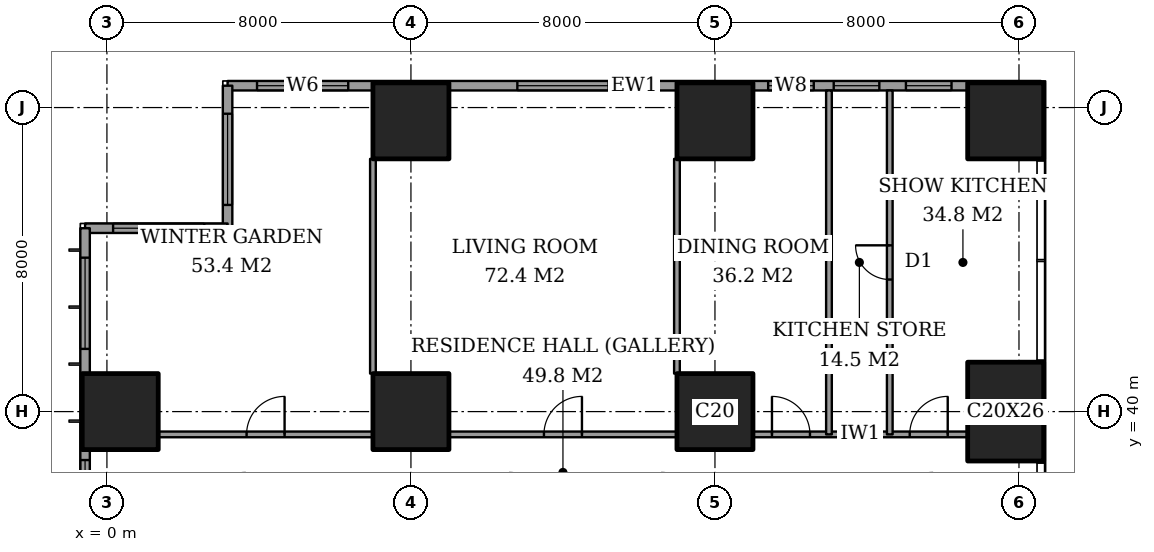
"""IFC4 building model, lengths in metres.
Left out: names, types, materials, properties, quantities, classifications, styles, units other than length and angle.
Written with IfcOpenShell. Run it as: python <this file> out.ifc"""

import sys

from ifc_helpers import new_model, si_unit, direction, frame, frame_2d, origin, origin_2d, place, context, subcontext, project, spatial, rectangle, extrude, element, fill, save


model = new_model("IFC4")
c1 = context("Model", 3, precision=1e-05, world=origin(), true_north=direction((0.0, 1.0)))
c2 = subcontext(c1, "Body", "Model", "MODEL_VIEW")
j1 = project(units=[si_unit("LENGTHUNIT", "METRE"), si_unit("PLANEANGLEUNIT", "RADIAN")], contexts=[c1])
p1 = place(None, origin())
s1 = spatial("IfcSite", under=j1, at=p1, CompositionType="ELEMENT")
p2 = place(p1, origin())
s2 = spatial("IfcBuilding", under=s1, at=p2, CompositionType="ELEMENT")
p3 = place(p2, frame((0.0, 0.0, 80.0)))
s3 = spatial("IfcBuildingStorey", under=s2, at=p3, CompositionType="ELEMENT", Elevation=80.0)
for number, where, z_axis, x_axis in (
    (1, (0.35, 40.0, 0.0), (0.0, 0.0, 1.0), (1.0, 0.0, 0.0)),
    (2, (8.0, 40.0, 0.0), (0.0, 0.0, 1.0), (1.0, 0.0, 0.0)),
    (3, (8.0, 47.65, 0.0), (0.0, 0.0, 1.0), (1.0, 0.0, 0.0)),
    (4, (16.0, 40.0, 0.0), (0.0, 0.0, 1.0), (1.0, 0.0, 0.0)),
    (5, (16.0, 47.65, 0.0), (0.0, 0.0, 1.0), (1.0, 0.0, 0.0)),
):
    element("IfcColumn", number, at=place(p3, frame(where, z_axis=z_axis, x_axis=x_axis)), inside=s3, PredefinedType="COLUMN", context=c2, shape_type="SweptSolid", body=[
        extrude(rectangle(XDim=2.0, YDim=2.0, at=origin_2d()), origin(), (0.0, 0.0, 1.0), 3.6),
    ])
p4 = place(p3, frame((23.65, 40.0, 0.0), z_axis=(0.0, 0.0, 1.0), x_axis=(1.0, 0.0, 0.0)))
e6 = element("IfcColumn", 6, at=p4, inside=s3, PredefinedType="COLUMN", context=c2, shape_type="SweptSolid", body=[
    extrude(rectangle(XDim=2.0, YDim=2.6, at=origin_2d()), origin(), (0.0, 0.0, 1.0), 3.6),
])
p5 = place(p3, frame((23.65, 47.65, 0.0), z_axis=(0.0, 0.0, 1.0), x_axis=(1.0, 0.0, 0.0)))
e7 = element("IfcColumn", 7, at=p5, inside=s3, PredefinedType="COLUMN", context=c2, shape_type="SweptSolid", body=[
    extrude(rectangle(XDim=2.0, YDim=2.0, at=origin_2d()), origin(), (0.0, 0.0, 1.0), 3.6),
])
p6 = place(p3, frame((24.575, 48.575, 0.0), z_axis=(0.0, 0.0, 1.0), x_axis=(-1.0, 0.0, 0.0)))
e8 = element("IfcWall", 8, at=p6, inside=s3, PredefinedType="SOLIDWALL", context=c2, shape_type="SweptSolid", body=[
    extrude(rectangle(XDim=21.4, YDim=0.25, at=frame_2d((10.7, 0.0))), origin(), (0.0, 0.0, 1.0), 3.6),
])
p7 = place(p6, frame((2.35, 0.0, 0.6)))
e9 = element("IfcOpeningElement", 9, at=p7, cuts=e8, PredefinedType="OPENING", context=c2, shape_type="SweptSolid", body=[
    extrude(rectangle(XDim=1.2, YDim=2.0, at=frame_2d((0.6, 1.0))), frame((0.0, 0.135, 0.0), z_axis=(0.0, -1.0, 0.0), x_axis=(1.0, 0.0, 0.0)), (0.0, 0.0, 1.0), 0.27),
])
p8 = place(p6, frame((4.25, 0.0, 0.6)))
e10 = element("IfcOpeningElement", 10, at=p8, cuts=e8, PredefinedType="OPENING", context=c2, shape_type="SweptSolid", body=[
    extrude(rectangle(XDim=1.2, YDim=2.0, at=frame_2d((0.6, 1.0))), frame((0.0, 0.135, 0.0), z_axis=(0.0, -1.0, 0.0), x_axis=(1.0, 0.0, 0.0)), (0.0, 0.0, 1.0), 0.27),
])
p9 = place(p6, frame((5.975, 0.0, 0.6)))
e11 = element("IfcOpeningElement", 11, at=p9, cuts=e8, PredefinedType="OPENING", context=c2, shape_type="SweptSolid", body=[
    extrude(rectangle(XDim=1.2, YDim=2.0, at=frame_2d((0.6, 1.0))), frame((0.0, 0.135, 0.0), z_axis=(0.0, -1.0, 0.0), x_axis=(1.0, 0.0, 0.0)), (0.0, 0.0, 1.0), 0.27),
])
p10 = place(p6, frame((11.375, 0.0, 0.6)))
e12 = element("IfcOpeningElement", 12, at=p10, cuts=e8, PredefinedType="OPENING", context=c2, shape_type="SweptSolid", body=[
    extrude(rectangle(XDim=2.4, YDim=2.0, at=frame_2d((1.2, 1.0))), frame((0.0, 0.135, 0.0), z_axis=(0.0, -1.0, 0.0), x_axis=(1.0, 0.0, 0.0)), (0.0, 0.0, 1.0), 0.27),
])
p11 = place(p6, frame((18.225, 0.0, 0.6)))
e13 = element("IfcOpeningElement", 13, at=p11, cuts=e8, PredefinedType="OPENING", context=c2, shape_type="SweptSolid", body=[
    extrude(rectangle(XDim=2.4, YDim=2.0, at=frame_2d((1.2, 1.0))), frame((0.0, 0.135, 0.0), z_axis=(0.0, -1.0, 0.0), x_axis=(1.0, 0.0, 0.0)), (0.0, 0.0, 1.0), 0.27),
])
p12 = place(p3, frame((3.175, 48.575, 0.0), z_axis=(0.0, 0.0, 1.0), x_axis=(0.0, -1.0, 0.0)))
e14 = element("IfcWall", 14, at=p12, inside=s3, PredefinedType="SOLIDWALL", context=c2, shape_type="SweptSolid", body=[
    extrude(rectangle(XDim=3.75, YDim=0.25, at=frame_2d((1.875, 0.0))), origin(), (0.0, 0.0, 1.0), 3.6),
])
p13 = place(p12, frame((0.738, 0.0, 0.6)))
e15 = element("IfcOpeningElement", 15, at=p13, cuts=e14, PredefinedType="OPENING", context=c2, shape_type="SweptSolid", body=[
    extrude(rectangle(XDim=2.4, YDim=2.0, at=frame_2d((1.2, 1.0))), frame((0.0, 0.135, 0.0), z_axis=(0.0, -1.0, 0.0), x_axis=(1.0, 0.0, 0.0)), (0.0, 0.0, 1.0), 0.27),
])
p14 = place(p3, frame((3.175, 44.825, 0.0), z_axis=(0.0, 0.0, 1.0), x_axis=(-1.0, 0.0, 0.0)))
e16 = element("IfcWall", 16, at=p14, inside=s3, PredefinedType="SOLIDWALL", context=c2, shape_type="SweptSolid", body=[
    extrude(rectangle(XDim=3.75, YDim=0.25, at=frame_2d((1.875, 0.0))), origin(), (0.0, 0.0, 1.0), 3.6),
])
p15 = place(p14, frame((0.613, 0.0, 0.6)))
e17 = element("IfcOpeningElement", 17, at=p15, cuts=e16, PredefinedType="OPENING", context=c2, shape_type="SweptSolid", body=[
    extrude(rectangle(XDim=2.4, YDim=2.0, at=frame_2d((1.2, 1.0))), frame((0.0, 0.135, 0.0), z_axis=(0.0, -1.0, 0.0), x_axis=(1.0, 0.0, 0.0)), (0.0, 0.0, 1.0), 0.27),
])
p16 = place(p3, frame((-0.575, 44.825, 0.0), z_axis=(0.0, 0.0, 1.0), x_axis=(0.0, -1.0, 0.0)))
e18 = element("IfcWall", 18, at=p16, inside=s3, PredefinedType="SOLIDWALL", context=c2, shape_type="SweptSolid", body=[
    extrude(rectangle(XDim=41.65, YDim=0.25, at=frame_2d((20.825, 0.0))), origin(), (0.0, 0.0, 1.0), 3.6),
])
p17 = place(p16, frame((0.775, 0.0, 0.6)))
e19 = element("IfcOpeningElement", 19, at=p17, cuts=e18, PredefinedType="OPENING", context=c2, shape_type="SweptSolid", body=[
    extrude(rectangle(XDim=2.4, YDim=2.0, at=frame_2d((1.2, 1.0))), frame((0.0, 0.135, 0.0), z_axis=(0.0, -1.0, 0.0), x_axis=(1.0, 0.0, 0.0)), (0.0, 0.0, 1.0), 0.27),
])
p18 = place(p16, frame((6.1, 0.0, 0.6)))
e20 = element("IfcOpeningElement", 20, at=p18, cuts=e18, PredefinedType="OPENING", context=c2, shape_type="SweptSolid", body=[
    extrude(rectangle(XDim=1.2, YDim=2.0, at=frame_2d((0.6, 1.0))), frame((0.0, 0.135, 0.0), z_axis=(0.0, -1.0, 0.0), x_axis=(1.0, 0.0, 0.0)), (0.0, 0.0, 1.0), 0.27),
])
p19 = place(p16, frame((8.425, 0.0, 0.6)))
e21 = element("IfcOpeningElement", 21, at=p19, cuts=e18, PredefinedType="OPENING", context=c2, shape_type="SweptSolid", body=[
    extrude(rectangle(XDim=2.4, YDim=2.0, at=frame_2d((1.2, 1.0))), frame((0.0, 0.135, 0.0), z_axis=(0.0, -1.0, 0.0), x_axis=(1.0, 0.0, 0.0)), (0.0, 0.0, 1.0), 0.27),
])
p20 = place(p16, frame((15.625, 0.0, 0.6)))
e22 = element("IfcOpeningElement", 22, at=p20, cuts=e18, PredefinedType="OPENING", context=c2, shape_type="SweptSolid", body=[
    extrude(rectangle(XDim=2.4, YDim=2.0, at=frame_2d((1.2, 1.0))), frame((0.0, 0.135, 0.0), z_axis=(0.0, -1.0, 0.0), x_axis=(1.0, 0.0, 0.0)), (0.0, 0.0, 1.0), 0.27),
])
p21 = place(p16, frame((23.625, 0.0, 0.6)))
e23 = element("IfcOpeningElement", 23, at=p21, cuts=e18, PredefinedType="OPENING", context=c2, shape_type="SweptSolid", body=[
    extrude(rectangle(XDim=2.4, YDim=2.0, at=frame_2d((1.2, 1.0))), frame((0.0, 0.135, 0.0), z_axis=(0.0, -1.0, 0.0), x_axis=(1.0, 0.0, 0.0)), (0.0, 0.0, 1.0), 0.27),
])
p22 = place(p16, frame((30.825, 0.0, 0.6)))
e24 = element("IfcOpeningElement", 24, at=p22, cuts=e18, PredefinedType="OPENING", context=c2, shape_type="SweptSolid", body=[
    extrude(rectangle(XDim=2.4, YDim=2.0, at=frame_2d((1.2, 1.0))), frame((0.0, 0.135, 0.0), z_axis=(0.0, -1.0, 0.0), x_axis=(1.0, 0.0, 0.0)), (0.0, 0.0, 1.0), 0.27),
])
p23 = place(p16, frame((34.5, 0.0, 0.6)))
e25 = element("IfcOpeningElement", 25, at=p23, cuts=e18, PredefinedType="OPENING", context=c2, shape_type="SweptSolid", body=[
    extrude(rectangle(XDim=1.2, YDim=2.0, at=frame_2d((0.6, 1.0))), frame((0.0, 0.135, 0.0), z_axis=(0.0, -1.0, 0.0), x_axis=(1.0, 0.0, 0.0)), (0.0, 0.0, 1.0), 0.27),
])
p24 = place(p16, frame((38.475, 0.0, 0.6)))
e26 = element("IfcOpeningElement", 26, at=p24, cuts=e18, PredefinedType="OPENING", context=c2, shape_type="SweptSolid", body=[
    extrude(rectangle(XDim=2.4, YDim=2.0, at=frame_2d((1.2, 1.0))), frame((0.0, 0.135, 0.0), z_axis=(0.0, -1.0, 0.0), x_axis=(1.0, 0.0, 0.0)), (0.0, 0.0, 1.0), 0.27),
])
p25 = place(p3, frame((1.35, 39.4, 0.0), z_axis=(0.0, 0.0, 1.0), x_axis=(1.0, 0.0, 0.0)))
e27 = element("IfcWall", 27, at=p25, inside=s3, PredefinedType="PARTITIONING", context=c2, shape_type="SweptSolid", body=[
    extrude(rectangle(XDim=5.65, YDim=0.15, at=frame_2d((2.825, 0.0))), origin(), (0.0, 0.0, 1.0), 3.35),
])
p26 = place(p25, frame((2.325, 0.0, 0.0)))
e28 = element("IfcOpeningElement", 28, at=p26, cuts=e27, PredefinedType="OPENING", context=c2, shape_type="SweptSolid", body=[
    extrude(rectangle(XDim=1.0, YDim=2.1, at=frame_2d((0.5, 1.05))), frame((0.0, 0.085, 0.0), z_axis=(0.0, -1.0, 0.0), x_axis=(1.0, 0.0, 0.0)), (0.0, 0.0, 1.0), 0.17),
])
p27 = place(p3, frame((9.0, 39.4, 0.0), z_axis=(0.0, 0.0, 1.0), x_axis=(1.0, 0.0, 0.0)))
e29 = element("IfcWall", 29, at=p27, inside=s3, PredefinedType="PARTITIONING", context=c2, shape_type="SweptSolid", body=[
    extrude(rectangle(XDim=6.0, YDim=0.15, at=frame_2d((3.0, 0.0))), origin(), (0.0, 0.0, 1.0), 3.35),
])
p28 = place(p27, frame((2.5, 0.0, 0.0)))
e30 = element("IfcOpeningElement", 30, at=p28, cuts=e29, PredefinedType="OPENING", context=c2, shape_type="SweptSolid", body=[
    extrude(rectangle(XDim=1.0, YDim=2.1, at=frame_2d((0.5, 1.05))), frame((0.0, 0.085, 0.0), z_axis=(0.0, -1.0, 0.0), x_axis=(1.0, 0.0, 0.0)), (0.0, 0.0, 1.0), 0.17),
])
p29 = place(p3, frame((17.0, 39.4, 0.0), z_axis=(0.0, 0.0, 1.0), x_axis=(1.0, 0.0, 0.0)))
e31 = element("IfcWall", 31, at=p29, inside=s3, PredefinedType="PARTITIONING", context=c2, shape_type="SweptSolid", body=[
    extrude(rectangle(XDim=5.65, YDim=0.15, at=frame_2d((2.825, 0.0))), origin(), (0.0, 0.0, 1.0), 3.35),
])
p30 = place(p29, frame((0.5, 0.0, 0.0)))
e32 = element("IfcOpeningElement", 32, at=p30, cuts=e31, PredefinedType="OPENING", context=c2, shape_type="SweptSolid", body=[
    extrude(rectangle(XDim=1.0, YDim=2.1, at=frame_2d((0.5, 1.05))), frame((0.0, 0.085, 0.0), z_axis=(0.0, -1.0, 0.0), x_axis=(1.0, 0.0, 0.0)), (0.0, 0.0, 1.0), 0.17),
])
p31 = place(p29, frame((4.125, 0.0, 0.0)))
e33 = element("IfcOpeningElement", 33, at=p31, cuts=e31, PredefinedType="OPENING", context=c2, shape_type="SweptSolid", body=[
    extrude(rectangle(XDim=1.0, YDim=2.1, at=frame_2d((0.5, 1.05))), frame((0.0, 0.085, 0.0), z_axis=(0.0, -1.0, 0.0), x_axis=(1.0, 0.0, 0.0)), (0.0, 0.0, 1.0), 0.17),
])
for number, where, z_axis, x_axis in (
    (34, (7.0, 41.0, 0.0), (0.0, 0.0, 1.0), (0.0, 1.0, 0.0)),
    (35, (15.0, 41.0, 0.0), (0.0, 0.0, 1.0), (0.0, 1.0, 0.0)),
):
    element("IfcWall", number, at=place(p3, frame(where, z_axis=z_axis, x_axis=x_axis)), inside=s3, PredefinedType="PARTITIONING", context=c2, shape_type="SweptSolid", body=[
        extrude(rectangle(XDim=5.65, YDim=0.15, at=frame_2d((2.825, 0.0))), origin(), (0.0, 0.0, 1.0), 3.35),
    ])
p32 = place(p3, frame((19.0, 39.4, 0.0), z_axis=(0.0, 0.0, 1.0), x_axis=(0.0, 1.0, 0.0)))
e36 = element("IfcWall", 36, at=p32, inside=s3, PredefinedType="PARTITIONING", context=c2, shape_type="SweptSolid", body=[
    extrude(rectangle(XDim=9.05, YDim=0.15, at=frame_2d((4.525, 0.0))), origin(), (0.0, 0.0, 1.0), 3.35),
])
p33 = place(p3, frame((20.6, 39.4, 0.0), z_axis=(0.0, 0.0, 1.0), x_axis=(0.0, 1.0, 0.0)))
e37 = element("IfcWall", 37, at=p33, inside=s3, PredefinedType="PARTITIONING", context=c2, shape_type="SweptSolid", body=[
    extrude(rectangle(XDim=9.05, YDim=0.15, at=frame_2d((4.525, 0.0))), origin(), (0.0, 0.0, 1.0), 3.35),
])
p34 = place(p33, frame((4.075, 0.0, 0.0)))
e38 = element("IfcOpeningElement", 38, at=p34, cuts=e37, PredefinedType="OPENING", context=c2, shape_type="SweptSolid", body=[
    extrude(rectangle(XDim=0.9, YDim=2.1, at=frame_2d((0.45, 1.05))), frame((0.0, 0.085, 0.0), z_axis=(0.0, -1.0, 0.0), x_axis=(1.0, 0.0, 0.0)), (0.0, 0.0, 1.0), 0.17),
])
p35 = place(p7, origin())
e39 = element("IfcWindow", 39, at=p35, inside=s3, PartitioningType="SINGLE_PANEL", PredefinedType="WINDOW", context=c2, shape_type="SweptSolid", body=[
    extrude(rectangle(XDim=1.2, YDim=2.0, at=frame_2d((0.6, 1.0))), frame((0.0, 0.03, 0.0), z_axis=(0.0, -1.0, 0.0), x_axis=(1.0, 0.0, 0.0)), (0.0, 0.0, 1.0), 0.06),
])
fill(e9, e39)
p36 = place(p8, origin())
e40 = element("IfcWindow", 40, at=p36, inside=s3, PartitioningType="SINGLE_PANEL", PredefinedType="WINDOW", context=c2, shape_type="SweptSolid", body=[
    extrude(rectangle(XDim=1.2, YDim=2.0, at=frame_2d((0.6, 1.0))), frame((0.0, 0.03, 0.0), z_axis=(0.0, -1.0, 0.0), x_axis=(1.0, 0.0, 0.0)), (0.0, 0.0, 1.0), 0.06),
])
fill(e10, e40)
p37 = place(p9, origin())
e41 = element("IfcWindow", 41, at=p37, inside=s3, PartitioningType="SINGLE_PANEL", PredefinedType="WINDOW", context=c2, shape_type="SweptSolid", body=[
    extrude(rectangle(XDim=1.2, YDim=2.0, at=frame_2d((0.6, 1.0))), frame((0.0, 0.03, 0.0), z_axis=(0.0, -1.0, 0.0), x_axis=(1.0, 0.0, 0.0)), (0.0, 0.0, 1.0), 0.06),
])
fill(e11, e41)
p38 = place(p10, origin())
e42 = element("IfcWindow", 42, at=p38, inside=s3, PartitioningType="SINGLE_PANEL", PredefinedType="WINDOW", context=c2, shape_type="SweptSolid", body=[
    extrude(rectangle(XDim=2.4, YDim=2.0, at=frame_2d((1.2, 1.0))), frame((0.0, 0.03, 0.0), z_axis=(0.0, -1.0, 0.0), x_axis=(1.0, 0.0, 0.0)), (0.0, 0.0, 1.0), 0.06),
])
fill(e12, e42)
p39 = place(p11, origin())
e43 = element("IfcWindow", 43, at=p39, inside=s3, PartitioningType="SINGLE_PANEL", PredefinedType="WINDOW", context=c2, shape_type="SweptSolid", body=[
    extrude(rectangle(XDim=2.4, YDim=2.0, at=frame_2d((1.2, 1.0))), frame((0.0, 0.03, 0.0), z_axis=(0.0, -1.0, 0.0), x_axis=(1.0, 0.0, 0.0)), (0.0, 0.0, 1.0), 0.06),
])
fill(e13, e43)
p40 = place(p13, origin())
e44 = element("IfcWindow", 44, at=p40, inside=s3, PartitioningType="SINGLE_PANEL", PredefinedType="WINDOW", context=c2, shape_type="SweptSolid", body=[
    extrude(rectangle(XDim=2.4, YDim=2.0, at=frame_2d((1.2, 1.0))), frame((0.0, 0.03, 0.0), z_axis=(0.0, -1.0, 0.0), x_axis=(1.0, 0.0, 0.0)), (0.0, 0.0, 1.0), 0.06),
])
fill(e15, e44)
p41 = place(p15, origin())
e45 = element("IfcWindow", 45, at=p41, inside=s3, PartitioningType="SINGLE_PANEL", PredefinedType="WINDOW", context=c2, shape_type="SweptSolid", body=[
    extrude(rectangle(XDim=2.4, YDim=2.0, at=frame_2d((1.2, 1.0))), frame((0.0, 0.03, 0.0), z_axis=(0.0, -1.0, 0.0), x_axis=(1.0, 0.0, 0.0)), (0.0, 0.0, 1.0), 0.06),
])
fill(e17, e45)
p42 = place(p17, origin())
e46 = element("IfcWindow", 46, at=p42, inside=s3, PartitioningType="SINGLE_PANEL", PredefinedType="WINDOW", context=c2, shape_type="SweptSolid", body=[
    extrude(rectangle(XDim=2.4, YDim=2.0, at=frame_2d((1.2, 1.0))), frame((0.0, 0.03, 0.0), z_axis=(0.0, -1.0, 0.0), x_axis=(1.0, 0.0, 0.0)), (0.0, 0.0, 1.0), 0.06),
])
fill(e19, e46)
p43 = place(p18, origin())
e47 = element("IfcWindow", 47, at=p43, inside=s3, PartitioningType="SINGLE_PANEL", PredefinedType="WINDOW", context=c2, shape_type="SweptSolid", body=[
    extrude(rectangle(XDim=1.2, YDim=2.0, at=frame_2d((0.6, 1.0))), frame((0.0, 0.03, 0.0), z_axis=(0.0, -1.0, 0.0), x_axis=(1.0, 0.0, 0.0)), (0.0, 0.0, 1.0), 0.06),
])
fill(e20, e47)
p44 = place(p26, origin())
e48 = element("IfcDoor", 48, at=p44, inside=s3, OperationType="SINGLE_SWING_LEFT", PredefinedType="DOOR", context=c2, shape_type="SweptSolid", body=[
    extrude(rectangle(XDim=1.0, YDim=2.1, at=frame_2d((0.5, 1.05))), frame((0.0, 0.025, 0.0), z_axis=(0.0, -1.0, 0.0), x_axis=(1.0, 0.0, 0.0)), (0.0, 0.0, 1.0), 0.05),
])
fill(e28, e48)
p45 = place(p28, origin())
e49 = element("IfcDoor", 49, at=p45, inside=s3, OperationType="SINGLE_SWING_LEFT", PredefinedType="DOOR", context=c2, shape_type="SweptSolid", body=[
    extrude(rectangle(XDim=1.0, YDim=2.1, at=frame_2d((0.5, 1.05))), frame((0.0, 0.025, 0.0), z_axis=(0.0, -1.0, 0.0), x_axis=(1.0, 0.0, 0.0)), (0.0, 0.0, 1.0), 0.05),
])
fill(e30, e49)
p46 = place(p30, origin())
e50 = element("IfcDoor", 50, at=p46, inside=s3, OperationType="SINGLE_SWING_RIGHT", PredefinedType="DOOR", context=c2, shape_type="SweptSolid", body=[
    extrude(rectangle(XDim=1.0, YDim=2.1, at=frame_2d((0.5, 1.05))), frame((0.0, 0.025, 0.0), z_axis=(0.0, -1.0, 0.0), x_axis=(1.0, 0.0, 0.0)), (0.0, 0.0, 1.0), 0.05),
])
fill(e32, e50)
p47 = place(p34, origin())
e51 = element("IfcDoor", 51, at=p47, inside=s3, OperationType="SINGLE_SWING_LEFT", PredefinedType="DOOR", context=c2, shape_type="SweptSolid", body=[
    extrude(rectangle(XDim=0.9, YDim=2.1, at=frame_2d((0.45, 1.05))), frame((0.0, 0.025, 0.0), z_axis=(0.0, -1.0, 0.0), x_axis=(1.0, 0.0, 0.0)), (0.0, 0.0, 1.0), 0.05),
])
fill(e38, e51)
p48 = place(p31, origin())
e52 = element("IfcDoor", 52, at=p48, inside=s3, OperationType="SINGLE_SWING_LEFT", PredefinedType="DOOR", context=c2, shape_type="SweptSolid", body=[
    extrude(rectangle(XDim=1.0, YDim=2.1, at=frame_2d((0.5, 1.05))), frame((0.0, 0.025, 0.0), z_axis=(0.0, -1.0, 0.0), x_axis=(1.0, 0.0, 0.0)), (0.0, 0.0, 1.0), 0.05),
])
fill(e33, e52)
save(model, sys.argv[1])
